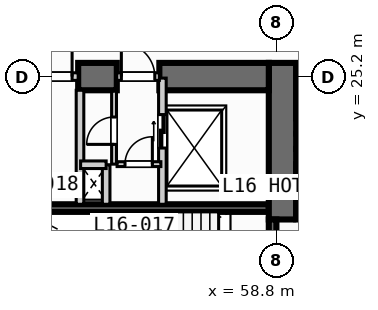
"""IFC4 building model, lengths in metres.
Left out: names, types, materials, properties, quantities, classifications, styles, units other than length and angle.
Written with IfcOpenShell. Run it as: python <this file> out.ifc"""

import sys

from ifc_helpers import new_model, si_unit, direction, frame, frame_2d, origin, place, context, subcontext, project, spatial, rectangle, extrude, element, fill, save


model = new_model("IFC4")
c1 = context("Model", 3, precision=1e-05, world=origin(), true_north=direction((0.0, 1.0)))
c2 = subcontext(c1, "Body", "Model", "MODEL_VIEW")
j1 = project(units=[si_unit("LENGTHUNIT", "METRE"), si_unit("PLANEANGLEUNIT", "RADIAN")], contexts=[c1])
p1 = place(None, origin())
s1 = spatial("IfcSite", under=j1, at=p1, CompositionType="ELEMENT")
p2 = place(p1, origin())
s2 = spatial("IfcBuilding", under=s1, at=p2, CompositionType="ELEMENT")
p3 = place(p2, frame((0.0, 0.0, 70.0)))
s3 = spatial("IfcBuildingStorey", under=s2, at=p3, CompositionType="ELEMENT", Elevation=70.0)
p4 = place(p3, frame((50.5, 20.875, 0.0), z_axis=(0.0, 0.0, 1.0), x_axis=(1.0, 0.0, 0.0)))
e1 = element("IfcWall", 1, at=p4, inside=s3, PredefinedType="SOLIDWALL", context=c2, shape_type="SweptSolid", body=[
    extrude(rectangle(XDim=8.05, YDim=0.25, at=frame_2d((4.025, 0.0))), origin(), (0.0, 0.0, 1.0), 3.55),
])
p5 = place(p3, frame((59.0, 20.5, 0.0), z_axis=(0.0, 0.0, 1.0), x_axis=(0.0, 1.0, 0.0)))
e2 = element("IfcWall", 2, at=p5, inside=s3, PredefinedType="SHEAR", context=c2, shape_type="SweptSolid", body=[
    extrude(rectangle(XDim=5.15, YDim=0.9, at=frame_2d((2.575, 0.0))), origin(), (0.0, 0.0, 1.0), 3.55),
])
p6 = place(p3, frame((52.28, 25.2, 0.0), z_axis=(0.0, 0.0, 1.0), x_axis=(1.0, 0.0, 0.0)))
e3 = element("IfcWall", 3, at=p6, inside=s3, PredefinedType="SHEAR", context=c2, shape_type="SweptSolid", body=[
    extrude(rectangle(XDim=1.27, YDim=0.9, at=frame_2d((0.635, 0.0))), origin(), (0.0, 0.0, 1.0), 3.55),
])
p7 = place(p3, frame((54.95, 25.2, 0.0), z_axis=(0.0, 0.0, 1.0), x_axis=(1.0, 0.0, 0.0)))
e4 = element("IfcWall", 4, at=p7, inside=s3, PredefinedType="SHEAR", context=c2, shape_type="SweptSolid", body=[
    extrude(rectangle(XDim=3.6, YDim=0.9, at=frame_2d((1.8, 0.0))), origin(), (0.0, 0.0, 1.0), 3.55),
])
p8 = place(p3, frame((58.675, 18.0, 0.0), z_axis=(0.0, 0.0, 1.0), x_axis=(0.0, 1.0, 0.0)))
e5 = element("IfcWall", 5, at=p8, inside=s3, PredefinedType="SOLIDWALL", context=c2, shape_type="SweptSolid", body=[
    extrude(rectangle(XDim=2.5, YDim=0.25, at=frame_2d((1.25, 0.0))), origin(), (0.0, 0.0, 1.0), 3.55),
])
p9 = place(p8, frame((0.7, 0.0, 0.0)))
e6 = element("IfcOpeningElement", 6, at=p9, cuts=e5, PredefinedType="OPENING", context=c2, shape_type="SweptSolid", body=[
    extrude(rectangle(XDim=1.1, YDim=2.15, at=frame_2d((0.55, 1.075))), frame((0.0, 0.135, 0.0), z_axis=(0.0, -1.0, 0.0), x_axis=(1.0, 0.0, 0.0)), (0.0, 0.0, 1.0), 0.27),
])
p10 = place(p3, frame((50.8, 25.2, 0.0), z_axis=(0.0, 0.0, 1.0), x_axis=(1.0, 0.0, 0.0)))
e7 = element("IfcWall", 7, at=p10, inside=s3, PredefinedType="SOLIDWALL", context=c2, shape_type="SweptSolid", body=[
    extrude(rectangle(XDim=1.48, YDim=0.25, at=frame_2d((0.74, 0.0))), origin(), (0.0, 0.0, 1.0), 3.55),
])
p11 = place(p10, frame((0.18, 0.0, 0.0)))
e8 = element("IfcOpeningElement", 8, at=p11, cuts=e7, PredefinedType="OPENING", context=c2, shape_type="SweptSolid", body=[
    extrude(rectangle(XDim=1.1, YDim=2.15, at=frame_2d((0.55, 1.075))), frame((0.0, 0.135, 0.0), z_axis=(0.0, -1.0, 0.0), x_axis=(1.0, 0.0, 0.0)), (0.0, 0.0, 1.0), 0.27),
])
p12 = place(p3, frame((52.34, 21.0, 0.0), z_axis=(0.0, 0.0, 1.0), x_axis=(0.0, 1.0, 0.0)))
e9 = element("IfcWall", 9, at=p12, inside=s3, PredefinedType="SOLIDWALL", context=c2, shape_type="SweptSolid", body=[
    extrude(rectangle(XDim=3.75, YDim=0.25, at=frame_2d((1.875, 0.0))), origin(), (0.0, 0.0, 1.0), 3.55),
])
p13 = place(p3, frame((55.05, 21.0, 0.0), z_axis=(0.0, 0.0, 1.0), x_axis=(0.0, 1.0, 0.0)))
e10 = element("IfcWall", 10, at=p13, inside=s3, PredefinedType="SOLIDWALL", context=c2, shape_type="SweptSolid", body=[
    extrude(rectangle(XDim=4.15, YDim=0.25, at=frame_2d((2.075, 0.0))), origin(), (0.0, 0.0, 1.0), 3.55),
])
p14 = place(p13, frame((1.85, 0.0, 0.0)))
e11 = element("IfcOpeningElement", 11, at=p14, cuts=e10, PredefinedType="OPENING", context=c2, shape_type="SweptSolid", body=[
    extrude(rectangle(XDim=1.1, YDim=2.15, at=frame_2d((0.55, 1.075))), frame((0.0, 0.135, 0.0), z_axis=(0.0, -1.0, 0.0), x_axis=(1.0, 0.0, 0.0)), (0.0, 0.0, 1.0), 0.27),
])
p15 = place(p3, frame((53.55, 25.2, 0.0), z_axis=(0.0, 0.0, 1.0), x_axis=(1.0, 0.0, 0.0)))
e12 = element("IfcWall", 12, at=p15, inside=s3, PredefinedType="SOLIDWALL", context=c2, shape_type="SweptSolid", body=[
    extrude(rectangle(XDim=1.4, YDim=0.25, at=frame_2d((0.7, 0.0))), origin(), (0.0, 0.0, 1.0), 3.55),
])
p16 = place(p15, frame((0.15, 0.0, 0.0)))
e13 = element("IfcOpeningElement", 13, at=p16, cuts=e12, PredefinedType="OPENING", context=c2, shape_type="SweptSolid", body=[
    extrude(rectangle(XDim=1.1, YDim=2.15, at=frame_2d((0.55, 1.075))), frame((0.0, 0.135, 0.0), z_axis=(0.0, -1.0, 0.0), x_axis=(1.0, 0.0, 0.0)), (0.0, 0.0, 1.0), 0.27),
])
p17 = place(p3, frame((53.2, 21.0, 0.0), z_axis=(0.0, 0.0, 1.0), x_axis=(0.0, 1.0, 0.0)))
e14 = element("IfcWall", 14, at=p17, inside=s3, PredefinedType="SOLIDWALL", context=c2, shape_type="SweptSolid", body=[
    extrude(rectangle(XDim=1.3, YDim=0.25, at=frame_2d((0.65, 0.0))), origin(), (0.0, 0.0, 1.0), 3.55),
])
p18 = place(p3, frame((52.36, 22.3, 0.0), z_axis=(0.0, 0.0, 1.0), x_axis=(1.0, 0.0, 0.0)))
e15 = element("IfcWall", 15, at=p18, inside=s3, PredefinedType="SOLIDWALL", context=c2, shape_type="SweptSolid", body=[
    extrude(rectangle(XDim=0.84, YDim=0.25, at=frame_2d((0.42, 0.0))), origin(), (0.0, 0.0, 1.0), 3.55),
])
p19 = place(p3, frame((53.56, 22.32, 0.0), z_axis=(0.0, 0.0, 1.0), x_axis=(1.0, 0.0, 0.0)))
e16 = element("IfcWall", 16, at=p19, inside=s3, PredefinedType="PARTITIONING", context=c2, shape_type="SweptSolid", body=[
    extrude(rectangle(XDim=1.44, YDim=0.16, at=frame_2d((0.72, 0.0))), origin(), (0.0, 0.0, 1.0), 3.55),
])
p20 = place(p19, frame((0.26, 0.0, 0.0)))
e17 = element("IfcOpeningElement", 17, at=p20, cuts=e16, PredefinedType="OPENING", context=c2, shape_type="SweptSolid", body=[
    extrude(rectangle(XDim=0.9, YDim=2.1, at=frame_2d((0.45, 1.05))), frame((0.0, 0.09, 0.0), z_axis=(0.0, -1.0, 0.0), x_axis=(1.0, 0.0, 0.0)), (0.0, 0.0, 1.0), 0.18),
])
p21 = place(p3, frame((53.46, 22.32, 0.0), z_axis=(0.0, 0.0, 1.0), x_axis=(0.0, 1.0, 0.0)))
e18 = element("IfcWall", 18, at=p21, inside=s3, PredefinedType="PARTITIONING", context=c2, shape_type="SweptSolid", body=[
    extrude(rectangle(XDim=2.4, YDim=0.16, at=frame_2d((1.2, 0.0))), origin(), (0.0, 0.0, 1.0), 3.55),
])
p22 = place(p21, frame((0.65, 0.0, 0.0)))
e19 = element("IfcOpeningElement", 19, at=p22, cuts=e18, PredefinedType="OPENING", context=c2, shape_type="SweptSolid", body=[
    extrude(rectangle(XDim=0.9, YDim=2.1, at=frame_2d((0.45, 1.05))), frame((0.0, 0.09, 0.0), z_axis=(0.0, -1.0, 0.0), x_axis=(1.0, 0.0, 0.0)), (0.0, 0.0, 1.0), 0.18),
])
p23 = place(p11, origin())
e20 = element("IfcDoor", 20, at=p23, inside=s3, OperationType="SINGLE_SWING_RIGHT", PredefinedType="DOOR", context=c2, shape_type="SweptSolid", body=[
    extrude(rectangle(XDim=1.1, YDim=2.15, at=frame_2d((0.55, 1.075))), frame((0.0, 0.025, 0.0), z_axis=(0.0, -1.0, 0.0), x_axis=(1.0, 0.0, 0.0)), (0.0, 0.0, 1.0), 0.05),
])
fill(e8, e20)
p24 = place(p14, origin())
e21 = element("IfcDoor", 21, at=p24, inside=s3, OperationType="SLIDING_TO_LEFT", PredefinedType="DOOR", context=c2, shape_type="SweptSolid", body=[
    extrude(rectangle(XDim=1.1, YDim=2.15, at=frame_2d((0.55, 1.075))), frame((0.0, 0.025, 0.0), z_axis=(0.0, -1.0, 0.0), x_axis=(1.0, 0.0, 0.0)), (0.0, 0.0, 1.0), 0.05),
])
fill(e11, e21)
p25 = place(p16, origin())
e22 = element("IfcDoor", 22, at=p25, inside=s3, OperationType="SINGLE_SWING_LEFT", PredefinedType="DOOR", context=c2, shape_type="SweptSolid", body=[
    extrude(rectangle(XDim=1.1, YDim=2.15, at=frame_2d((0.55, 1.075))), frame((0.0, 0.025, 0.0), z_axis=(0.0, -1.0, 0.0), x_axis=(1.0, 0.0, 0.0)), (0.0, 0.0, 1.0), 0.05),
])
fill(e13, e22)
p26 = place(p20, origin())
e23 = element("IfcDoor", 23, at=p26, inside=s3, OperationType="SINGLE_SWING_RIGHT", PredefinedType="DOOR", context=c2, shape_type="SweptSolid", body=[
    extrude(rectangle(XDim=0.9, YDim=2.1, at=frame_2d((0.45, 1.05))), frame((0.0, 0.025, 0.0), z_axis=(0.0, -1.0, 0.0), x_axis=(1.0, 0.0, 0.0)), (0.0, 0.0, 1.0), 0.05),
])
fill(e17, e23)
p27 = place(p22, origin())
e24 = element("IfcDoor", 24, at=p27, inside=s3, OperationType="SINGLE_SWING_LEFT", PredefinedType="DOOR", context=c2, shape_type="SweptSolid", body=[
    extrude(rectangle(XDim=0.9, YDim=2.1, at=frame_2d((0.45, 1.05))), frame((0.0, 0.025, 0.0), z_axis=(0.0, -1.0, 0.0), x_axis=(1.0, 0.0, 0.0)), (0.0, 0.0, 1.0), 0.05),
])
fill(e19, e24)
save(model, sys.argv[1])
